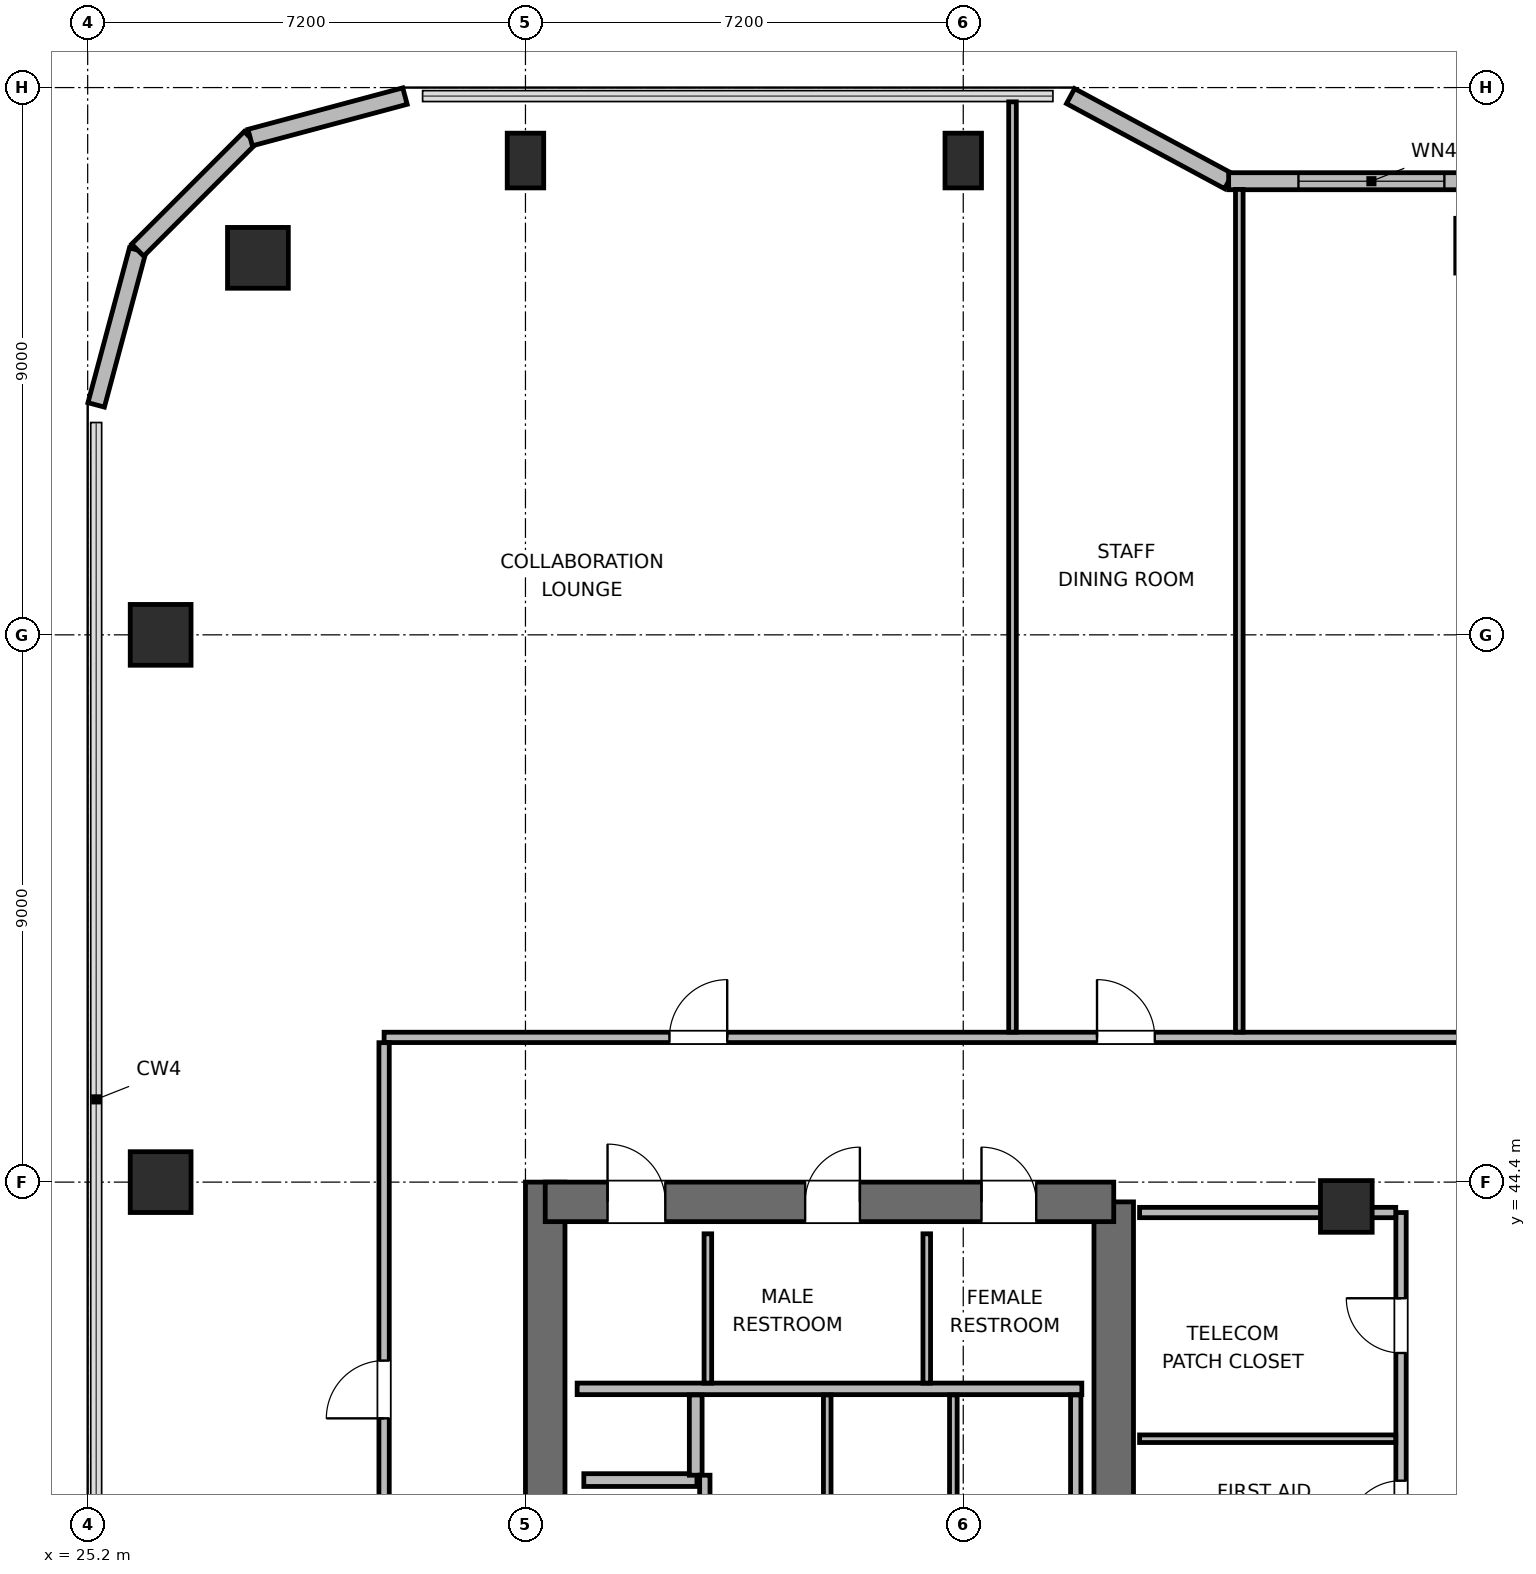
"""IFC4 building model, lengths in metres.
Left out: names, types, materials, properties, quantities, classifications, styles, units other than length and angle.
Written with IfcOpenShell. Run it as: python <this file> out.ifc"""

import sys

from ifc_helpers import new_model, si_unit, direction, frame, frame_2d, origin, origin_2d, place, context, subcontext, project, spatial, rectangle, circle, extrude, element, fill, save


model = new_model("IFC4")
c1 = context("Model", 3, precision=1e-05, world=origin(), true_north=direction((0.0, 1.0)))
c2 = subcontext(c1, "Body", "Model", "MODEL_VIEW")
j1 = project(units=[si_unit("LENGTHUNIT", "METRE"), si_unit("PLANEANGLEUNIT", "RADIAN")], contexts=[c1])
p1 = place(None, origin())
s1 = spatial("IfcSite", under=j1, at=p1, CompositionType="ELEMENT")
p2 = place(p1, origin())
s2 = spatial("IfcBuilding", under=s1, at=p2, CompositionType="ELEMENT")
p3 = place(p2, frame((0.0, 0.0, 247.2)))
s3 = spatial("IfcBuildingStorey", under=s2, at=p3, CompositionType="ELEMENT", Elevation=247.2)
p4 = place(p3, frame((32.725, 27.6, 0.0), z_axis=(0.0, 0.0, 1.0), x_axis=(0.0, 1.0, 0.0)))
e1 = element("IfcWall", 1, at=p4, inside=s3, PredefinedType="SHEAR", context=c2, shape_type="SweptSolid", body=[
    extrude(rectangle(XDim=16.8, YDim=0.65, at=frame_2d((8.4, 0.0))), origin(), (0.0, 0.0, 1.0), 3.9),
])
p5 = place(p3, frame((42.075, 37.8, 0.0), z_axis=(0.0, 0.0, 1.0), x_axis=(0.0, 1.0, 0.0)))
e2 = element("IfcWall", 2, at=p5, inside=s3, PredefinedType="SHEAR", context=c2, shape_type="SweptSolid", body=[
    extrude(rectangle(XDim=6.275, YDim=0.65, at=frame_2d((3.137, 0.0))), origin(), (0.0, 0.0, 1.0), 3.9),
])
p6 = place(p3, frame((32.725, 44.075, 0.0), z_axis=(0.0, 0.0, 1.0), x_axis=(1.0, 0.0, 0.0)))
e3 = element("IfcWall", 3, at=p6, inside=s3, PredefinedType="SHEAR", context=c2, shape_type="SweptSolid", body=[
    extrude(rectangle(XDim=9.35, YDim=0.65, at=frame_2d((4.675, 0.0))), origin(), (0.0, 0.0, 1.0), 3.9),
])
p7 = place(p6, frame((1.025, 0.0, 0.0)))
e4 = element("IfcOpeningElement", 4, at=p7, cuts=e3, PredefinedType="OPENING", context=c2, shape_type="SweptSolid", body=[
    extrude(rectangle(XDim=0.95, YDim=2.04, at=frame_2d((0.475, 1.02))), frame((0.0, 0.335, 0.0), z_axis=(0.0, -1.0, 0.0), x_axis=(1.0, 0.0, 0.0)), (0.0, 0.0, 1.0), 0.67),
])
p8 = place(p6, frame((4.275, 0.0, 0.0)))
e5 = element("IfcOpeningElement", 5, at=p8, cuts=e3, PredefinedType="OPENING", context=c2, shape_type="SweptSolid", body=[
    extrude(rectangle(XDim=0.9, YDim=2.02, at=frame_2d((0.45, 1.01))), frame((0.0, 0.335, 0.0), z_axis=(0.0, -1.0, 0.0), x_axis=(1.0, 0.0, 0.0)), (0.0, 0.0, 1.0), 0.67),
])
p9 = place(p6, frame((7.175, 0.0, 0.0)))
e6 = element("IfcOpeningElement", 6, at=p9, cuts=e3, PredefinedType="OPENING", context=c2, shape_type="SweptSolid", body=[
    extrude(rectangle(XDim=0.9, YDim=2.02, at=frame_2d((0.45, 1.01))), frame((0.0, 0.335, 0.0), z_axis=(0.0, -1.0, 0.0), x_axis=(1.0, 0.0, 0.0)), (0.0, 0.0, 1.0), 0.67),
])
p10 = place(p3, frame((28.0, 59.6, 0.0), z_axis=(0.0, 0.0, 1.0), x_axis=(1.0, 0.0, 0.0)))
e7 = element("IfcColumn", 7, at=p10, inside=s3, PredefinedType="COLUMN", context=c2, shape_type="SweptSolid", body=[
    extrude(circle(Radius=0.5, at=origin_2d()), origin(), (0.0, 0.0, 1.0), 3.9),
])
for number, where, z_axis, x_axis in (
    (8, (32.4, 61.2, 0.0), (0.0, 0.0, 1.0), (1.0, 0.0, 0.0)),
    (9, (39.6, 61.2, 0.0), (0.0, 0.0, 1.0), (1.0, 0.0, 0.0)),
    (10, (48.0, 59.8, 0.0), (0.0, 0.0, 1.0), (1.0, 0.0, 0.0)),
):
    element("IfcColumn", number, at=place(p3, frame(where, z_axis=z_axis, x_axis=x_axis)), inside=s3, PredefinedType="COLUMN", context=c2, shape_type="SweptSolid", body=[
        extrude(rectangle(XDim=0.6, YDim=0.9, at=origin_2d()), origin(), (0.0, 0.0, 1.0), 3.9),
    ])
for number, where, z_axis, x_axis in (
    (11, (26.4, 44.4, 0.0), (0.0, 0.0, 1.0), (1.0, 0.0, 0.0)),
    (12, (26.4, 53.4, 0.0), (0.0, 0.0, 1.0), (1.0, 0.0, 0.0)),
):
    element("IfcColumn", number, at=place(p3, frame(where, z_axis=z_axis, x_axis=x_axis)), inside=s3, PredefinedType="COLUMN", context=c2, shape_type="SweptSolid", body=[
        extrude(rectangle(XDim=1.0, YDim=1.0, at=origin_2d()), origin(), (0.0, 0.0, 1.0), 3.9),
    ])
p11 = place(p3, frame((45.9, 44.0, 0.0), z_axis=(0.0, 0.0, 1.0), x_axis=(1.0, 0.0, 0.0)))
e13 = element("IfcColumn", 13, at=p11, inside=s3, PredefinedType="COLUMN", context=c2, shape_type="SweptSolid", body=[
    extrude(rectangle(XDim=0.85, YDim=0.85, at=origin_2d()), origin(), (0.0, 0.0, 1.0), 3.9),
])
p12 = place(p3, frame((25.34, 57.182, 0.0), z_axis=(0.0, 0.0, 1.0), x_axis=(0.2588904131, 0.965906700466, 0.0)))
e14 = element("IfcWall", 14, at=p12, inside=s3, PredefinedType="SOLIDWALL", context=c2, shape_type="SweptSolid", body=[
    extrude(rectangle(XDim=2.636, YDim=0.28, at=frame_2d((1.318, 0.0))), origin(), (0.0, 0.0, 1.0), 3.68),
])
p13 = place(p3, frame((26.022, 59.728, 0.0), z_axis=(0.0, 0.0, 1.0), x_axis=(0.707153437963, 0.707060121331, 0.0)))
e15 = element("IfcWall", 15, at=p13, inside=s3, PredefinedType="SOLIDWALL", context=c2, shape_type="SweptSolid", body=[
    extrude(rectangle(XDim=2.616, YDim=0.28, at=frame_2d((1.308, 0.0))), origin(), (0.0, 0.0, 1.0), 3.68),
])
p14 = place(p3, frame((27.873, 61.577, 0.0), z_axis=(0.0, 0.0, 1.0), x_axis=(0.965883534663, 0.258976828051, 0.0)))
e16 = element("IfcWall", 16, at=p14, inside=s3, PredefinedType="SOLIDWALL", context=c2, shape_type="SweptSolid", body=[
    extrude(rectangle(XDim=2.636, YDim=0.28, at=frame_2d((1.318, 0.0))), origin(), (0.0, 0.0, 1.0), 3.68),
])
p15 = place(p3, frame((41.365, 62.26, 0.0), z_axis=(0.0, 0.0, 1.0), x_axis=(0.880473754814, -0.474094892488, 0.0)))
e17 = element("IfcWall", 17, at=p15, inside=s3, PredefinedType="SOLIDWALL", context=c2, shape_type="SweptSolid", body=[
    extrude(rectangle(XDim=2.953, YDim=0.28, at=frame_2d((1.477, 0.0))), origin(), (0.0, 0.0, 1.0), 2.265),
])
p16 = place(p3, frame((43.965, 60.86, 0.0), z_axis=(0.0, 0.0, 1.0), x_axis=(1.0, 0.0, 0.0)))
e18 = element("IfcWall", 18, at=p16, inside=s3, PredefinedType="SOLIDWALL", context=c2, shape_type="SweptSolid", body=[
    extrude(rectangle(XDim=4.695, YDim=0.28, at=frame_2d((2.348, 0.0))), origin(), (0.0, 0.0, 1.0), 2.265),
])
p17 = place(p16, frame((1.148, 0.0, 0.85)))
e19 = element("IfcOpeningElement", 19, at=p17, cuts=e18, PredefinedType="OPENING", context=c2, shape_type="SweptSolid", body=[
    extrude(rectangle(XDim=2.4, YDim=1.15, at=frame_2d((1.2, 0.575))), frame((0.0, 0.15, 0.0), z_axis=(0.0, -1.0, 0.0), x_axis=(1.0, 0.0, 0.0)), (0.0, 0.0, 1.0), 0.3),
])
p18 = place(p3, frame((33.25, 41.0, 0.0), z_axis=(0.0, 0.0, 1.0), x_axis=(1.0, 0.0, 0.0)))
e20 = element("IfcWall", 20, at=p18, inside=s3, PredefinedType="PLUMBINGWALL", context=c2, shape_type="SweptSolid", body=[
    extrude(rectangle(XDim=8.3, YDim=0.19, at=frame_2d((4.15, 0.0))), origin(), (0.0, 0.0, 1.0), 3.68),
])
for number, where, z_axis, x_axis in (
    (21, (35.4, 41.095, 0.0), (0.0, 0.0, 1.0), (0.0, 1.0, 0.0)),
    (22, (39.0, 41.095, 0.0), (0.0, 0.0, 1.0), (0.0, 1.0, 0.0)),
):
    element("IfcWall", number, at=place(p3, frame(where, z_axis=z_axis, x_axis=x_axis)), inside=s3, PredefinedType="PARTITIONING", context=c2, shape_type="SweptSolid", body=[
        extrude(rectangle(XDim=2.455, YDim=0.125, at=frame_2d((1.228, 0.0))), origin(), (0.0, 0.0, 1.0), 3.68),
    ])
p19 = place(p3, frame((33.36, 39.5, 0.0), z_axis=(0.0, 0.0, 1.0), x_axis=(1.0, 0.0, 0.0)))
e23 = element("IfcWall", 23, at=p19, inside=s3, PredefinedType="PARTITIONING", context=c2, shape_type="SweptSolid", body=[
    extrude(rectangle(XDim=1.86, YDim=0.21, at=frame_2d((0.93, 0.0))), origin(), (0.0, 0.0, 1.0), 3.68),
])
p20 = place(p3, frame((35.2, 39.58, 0.0), z_axis=(0.0, 0.0, 1.0), x_axis=(0.0, 1.0, 0.0)))
e24 = element("IfcWall", 24, at=p20, inside=s3, PredefinedType="PARTITIONING", context=c2, shape_type="SweptSolid", body=[
    extrude(rectangle(XDim=1.32, YDim=0.21, at=frame_2d((0.66, 0.0))), origin(), (0.0, 0.0, 1.0), 3.68),
])
p21 = place(p3, frame((35.35, 38.087, 0.0), z_axis=(0.0, 0.0, 1.0), x_axis=(0.0, 1.0, 0.0)))
e25 = element("IfcWall", 25, at=p21, inside=s3, PredefinedType="PARTITIONING", context=c2, shape_type="SweptSolid", body=[
    extrude(rectangle(XDim=1.493, YDim=0.17, at=frame_2d((0.747, 0.0))), origin(), (0.0, 0.0, 1.0), 3.68),
])
p22 = place(p3, frame((41.45, 38.087, 0.0), z_axis=(0.0, 0.0, 1.0), x_axis=(0.0, 1.0, 0.0)))
e26 = element("IfcWall", 26, at=p22, inside=s3, PredefinedType="PARTITIONING", context=c2, shape_type="SweptSolid", body=[
    extrude(rectangle(XDim=2.813, YDim=0.17, at=frame_2d((1.406, 0.0))), origin(), (0.0, 0.0, 1.0), 3.68),
])
for number, where, z_axis, x_axis in (
    (27, (37.363, 38.087, 0.0), (0.0, 0.0, 1.0), (0.0, 1.0, 0.0)),
    (28, (39.437, 38.087, 0.0), (0.0, 0.0, 1.0), (0.0, 1.0, 0.0)),
):
    element("IfcWall", number, at=place(p3, frame(where, z_axis=z_axis, x_axis=x_axis)), inside=s3, PredefinedType="PARTITIONING", context=c2, shape_type="SweptSolid", body=[
        extrude(rectangle(XDim=2.813, YDim=0.125, at=frame_2d((1.406, 0.0))), origin(), (0.0, 0.0, 1.0), 3.68),
    ])
p23 = place(p3, frame((46.8, 37.9, 0.0), z_axis=(0.0, 0.0, 1.0), x_axis=(0.0, 1.0, 0.0)))
e29 = element("IfcWall", 29, at=p23, inside=s3, PredefinedType="PARTITIONING", context=c2, shape_type="SweptSolid", body=[
    extrude(rectangle(XDim=6.0, YDim=0.17, at=frame_2d((3.0, 0.0))), origin(), (0.0, 0.0, 1.0), 3.68),
])
p24 = place(p23, frame((0.69, 0.0, 0.0)))
e30 = element("IfcOpeningElement", 30, at=p24, cuts=e29, PredefinedType="OPENING", context=c2, shape_type="SweptSolid", body=[
    extrude(rectangle(XDim=0.9, YDim=2.02, at=frame_2d((0.45, 1.01))), frame((0.0, 0.095, 0.0), z_axis=(0.0, -1.0, 0.0), x_axis=(1.0, 0.0, 0.0)), (0.0, 0.0, 1.0), 0.19),
])
p25 = place(p23, frame((3.69, 0.0, 0.0)))
e31 = element("IfcOpeningElement", 31, at=p25, cuts=e29, PredefinedType="OPENING", context=c2, shape_type="SweptSolid", body=[
    extrude(rectangle(XDim=0.9, YDim=2.02, at=frame_2d((0.45, 1.01))), frame((0.0, 0.095, 0.0), z_axis=(0.0, -1.0, 0.0), x_axis=(1.0, 0.0, 0.0)), (0.0, 0.0, 1.0), 0.19),
])
p26 = place(p3, frame((42.5, 43.9, 0.0), z_axis=(0.0, 0.0, 1.0), x_axis=(1.0, 0.0, 0.0)))
e32 = element("IfcWall", 32, at=p26, inside=s3, PredefinedType="PARTITIONING", context=c2, shape_type="SweptSolid", body=[
    extrude(rectangle(XDim=4.213, YDim=0.17, at=frame_2d((2.106, 0.0))), origin(), (0.0, 0.0, 1.0), 2.765),
])
p27 = place(p3, frame((42.5, 40.18, 0.0), z_axis=(0.0, 0.0, 1.0), x_axis=(1.0, 0.0, 0.0)))
e33 = element("IfcWall", 33, at=p27, inside=s3, PredefinedType="PARTITIONING", context=c2, shape_type="SweptSolid", body=[
    extrude(rectangle(XDim=4.213, YDim=0.125, at=frame_2d((2.106, 0.0))), origin(), (0.0, 0.0, 1.0), 3.68),
])
p28 = place(p3, frame((30.075, 46.78, 0.0), z_axis=(0.0, 0.0, 1.0), x_axis=(1.0, 0.0, 0.0)))
e34 = element("IfcWall", 34, at=p28, inside=s3, PredefinedType="PARTITIONING", context=c2, shape_type="SweptSolid", body=[
    extrude(rectangle(XDim=33.525, YDim=0.17, at=frame_2d((16.763, 0.0))), origin(), (0.0, 0.0, 1.0), 3.68),
])
p29 = place(p28, frame((4.693, 0.0, 0.0)))
e35 = element("IfcOpeningElement", 35, at=p29, cuts=e34, PredefinedType="OPENING", context=c2, shape_type="SweptSolid", body=[
    extrude(rectangle(XDim=0.95, YDim=2.04, at=frame_2d((0.475, 1.02))), frame((0.0, 0.095, 0.0), z_axis=(0.0, -1.0, 0.0), x_axis=(1.0, 0.0, 0.0)), (0.0, 0.0, 1.0), 0.19),
])
p30 = place(p28, frame((11.725, 0.0, 0.0)))
e36 = element("IfcOpeningElement", 36, at=p30, cuts=e34, PredefinedType="OPENING", context=c2, shape_type="SweptSolid", body=[
    extrude(rectangle(XDim=0.95, YDim=2.04, at=frame_2d((0.475, 1.02))), frame((0.0, 0.095, 0.0), z_axis=(0.0, -1.0, 0.0), x_axis=(1.0, 0.0, 0.0)), (0.0, 0.0, 1.0), 0.19),
])
p31 = place(p28, frame((19.505, 0.0, 0.0)))
e37 = element("IfcOpeningElement", 37, at=p31, cuts=e34, PredefinedType="OPENING", context=c2, shape_type="SweptSolid", body=[
    extrude(rectangle(XDim=0.95, YDim=2.04, at=frame_2d((0.475, 1.02))), frame((0.0, 0.095, 0.0), z_axis=(0.0, -1.0, 0.0), x_axis=(1.0, 0.0, 0.0)), (0.0, 0.0, 1.0), 0.19),
])
p32 = place(p28, frame((29.235, 0.0, 0.0)))
e38 = element("IfcOpeningElement", 38, at=p32, cuts=e34, PredefinedType="OPENING", context=c2, shape_type="SweptSolid", body=[
    extrude(rectangle(XDim=0.95, YDim=2.04, at=frame_2d((0.475, 1.02))), frame((0.0, 0.095, 0.0), z_axis=(0.0, -1.0, 0.0), x_axis=(1.0, 0.0, 0.0)), (0.0, 0.0, 1.0), 0.19),
])
p33 = place(p3, frame((30.075, 25.307, 0.0), z_axis=(0.0, 0.0, 1.0), x_axis=(0.0, 1.0, 0.0)))
e39 = element("IfcWall", 39, at=p33, inside=s3, PredefinedType="PARTITIONING", context=c2, shape_type="SweptSolid", body=[
    extrude(rectangle(XDim=21.386, YDim=0.17, at=frame_2d((10.693, 0.0))), origin(), (0.0, 0.0, 1.0), 3.68),
])
p34 = place(p33, frame((4.428, 0.0, 0.0)))
e40 = element("IfcOpeningElement", 40, at=p34, cuts=e39, PredefinedType="OPENING", context=c2, shape_type="SweptSolid", body=[
    extrude(rectangle(XDim=0.95, YDim=2.04, at=frame_2d((0.475, 1.02))), frame((0.0, 0.095, 0.0), z_axis=(0.0, -1.0, 0.0), x_axis=(1.0, 0.0, 0.0)), (0.0, 0.0, 1.0), 0.19),
])
p35 = place(p33, frame((15.208, 0.0, 0.0)))
e41 = element("IfcOpeningElement", 41, at=p35, cuts=e39, PredefinedType="OPENING", context=c2, shape_type="SweptSolid", body=[
    extrude(rectangle(XDim=0.95, YDim=2.04, at=frame_2d((0.475, 1.02))), frame((0.0, 0.095, 0.0), z_axis=(0.0, -1.0, 0.0), x_axis=(1.0, 0.0, 0.0)), (0.0, 0.0, 1.0), 0.19),
])
p36 = place(p3, frame((40.41, 46.867, 0.0), z_axis=(0.0, 0.0, 1.0), x_axis=(0.0, 1.0, 0.0)))
e42 = element("IfcWall", 42, at=p36, inside=s3, PredefinedType="PARTITIONING", context=c2, shape_type="SweptSolid", body=[
    extrude(rectangle(XDim=15.298, YDim=0.125, at=frame_2d((7.649, 0.0))), origin(), (0.0, 0.0, 1.0), 3.043),
])
p37 = place(p3, frame((44.14, 46.867, 0.0), z_axis=(0.0, 0.0, 1.0), x_axis=(0.0, 1.0, 0.0)))
e43 = element("IfcWall", 43, at=p37, inside=s3, PredefinedType="PARTITIONING", context=c2, shape_type="SweptSolid", body=[
    extrude(rectangle(XDim=13.858, YDim=0.125, at=frame_2d((6.929, 0.0))), origin(), (0.0, 0.0, 1.0), 3.043),
])
p38 = place(p17, origin())
e44 = element("IfcWindow", 44, at=p38, inside=s3, PartitioningType="SINGLE_PANEL", PredefinedType="WINDOW", context=c2, shape_type="SweptSolid", body=[
    extrude(rectangle(XDim=2.4, YDim=1.15, at=frame_2d((1.2, 0.575))), frame((0.0, 0.03, 0.0), z_axis=(0.0, -1.0, 0.0), x_axis=(1.0, 0.0, 0.0)), (0.0, 0.0, 1.0), 0.06),
])
fill(e19, e44)
p39 = place(p7, origin())
e45 = element("IfcDoor", 45, at=p39, inside=s3, OperationType="SINGLE_SWING_LEFT", PredefinedType="DOOR", context=c2, shape_type="SweptSolid", body=[
    extrude(rectangle(XDim=0.95, YDim=2.04, at=frame_2d((0.475, 1.02))), frame((0.0, 0.025, 0.0), z_axis=(0.0, -1.0, 0.0), x_axis=(1.0, 0.0, 0.0)), (0.0, 0.0, 1.0), 0.05),
])
fill(e4, e45)
p40 = place(p8, origin())
e46 = element("IfcDoor", 46, at=p40, inside=s3, OperationType="SINGLE_SWING_RIGHT", PredefinedType="DOOR", context=c2, shape_type="SweptSolid", body=[
    extrude(rectangle(XDim=0.9, YDim=2.02, at=frame_2d((0.45, 1.01))), frame((0.0, 0.025, 0.0), z_axis=(0.0, -1.0, 0.0), x_axis=(1.0, 0.0, 0.0)), (0.0, 0.0, 1.0), 0.05),
])
fill(e5, e46)
p41 = place(p9, origin())
e47 = element("IfcDoor", 47, at=p41, inside=s3, OperationType="SINGLE_SWING_LEFT", PredefinedType="DOOR", context=c2, shape_type="SweptSolid", body=[
    extrude(rectangle(XDim=0.9, YDim=2.02, at=frame_2d((0.45, 1.01))), frame((0.0, 0.025, 0.0), z_axis=(0.0, -1.0, 0.0), x_axis=(1.0, 0.0, 0.0)), (0.0, 0.0, 1.0), 0.05),
])
fill(e6, e47)
p42 = place(p24, origin())
e48 = element("IfcDoor", 48, at=p42, inside=s3, OperationType="SINGLE_SWING_LEFT", PredefinedType="DOOR", context=c2, shape_type="SweptSolid", body=[
    extrude(rectangle(XDim=0.9, YDim=2.02, at=frame_2d((0.45, 1.01))), frame((0.0, 0.025, 0.0), z_axis=(0.0, -1.0, 0.0), x_axis=(1.0, 0.0, 0.0)), (0.0, 0.0, 1.0), 0.05),
])
fill(e30, e48)
p43 = place(p25, origin())
e49 = element("IfcDoor", 49, at=p43, inside=s3, OperationType="SINGLE_SWING_RIGHT", PredefinedType="DOOR", context=c2, shape_type="SweptSolid", body=[
    extrude(rectangle(XDim=0.9, YDim=2.02, at=frame_2d((0.45, 1.01))), frame((0.0, 0.025, 0.0), z_axis=(0.0, -1.0, 0.0), x_axis=(1.0, 0.0, 0.0)), (0.0, 0.0, 1.0), 0.05),
])
fill(e31, e49)
p44 = place(p29, origin())
e50 = element("IfcDoor", 50, at=p44, inside=s3, OperationType="SINGLE_SWING_RIGHT", PredefinedType="DOOR", context=c2, shape_type="SweptSolid", body=[
    extrude(rectangle(XDim=0.95, YDim=2.04, at=frame_2d((0.475, 1.02))), frame((0.0, 0.025, 0.0), z_axis=(0.0, -1.0, 0.0), x_axis=(1.0, 0.0, 0.0)), (0.0, 0.0, 1.0), 0.05),
])
fill(e35, e50)
p45 = place(p30, origin())
e51 = element("IfcDoor", 51, at=p45, inside=s3, OperationType="SINGLE_SWING_LEFT", PredefinedType="DOOR", context=c2, shape_type="SweptSolid", body=[
    extrude(rectangle(XDim=0.95, YDim=2.04, at=frame_2d((0.475, 1.02))), frame((0.0, 0.025, 0.0), z_axis=(0.0, -1.0, 0.0), x_axis=(1.0, 0.0, 0.0)), (0.0, 0.0, 1.0), 0.05),
])
fill(e36, e51)
p46 = place(p35, origin())
e52 = element("IfcDoor", 52, at=p46, inside=s3, OperationType="SINGLE_SWING_LEFT", PredefinedType="DOOR", context=c2, shape_type="SweptSolid", body=[
    extrude(rectangle(XDim=0.95, YDim=2.04, at=frame_2d((0.475, 1.02))), frame((0.0, 0.025, 0.0), z_axis=(0.0, -1.0, 0.0), x_axis=(1.0, 0.0, 0.0)), (0.0, 0.0, 1.0), 0.05),
])
fill(e41, e52)
save(model, sys.argv[1])
